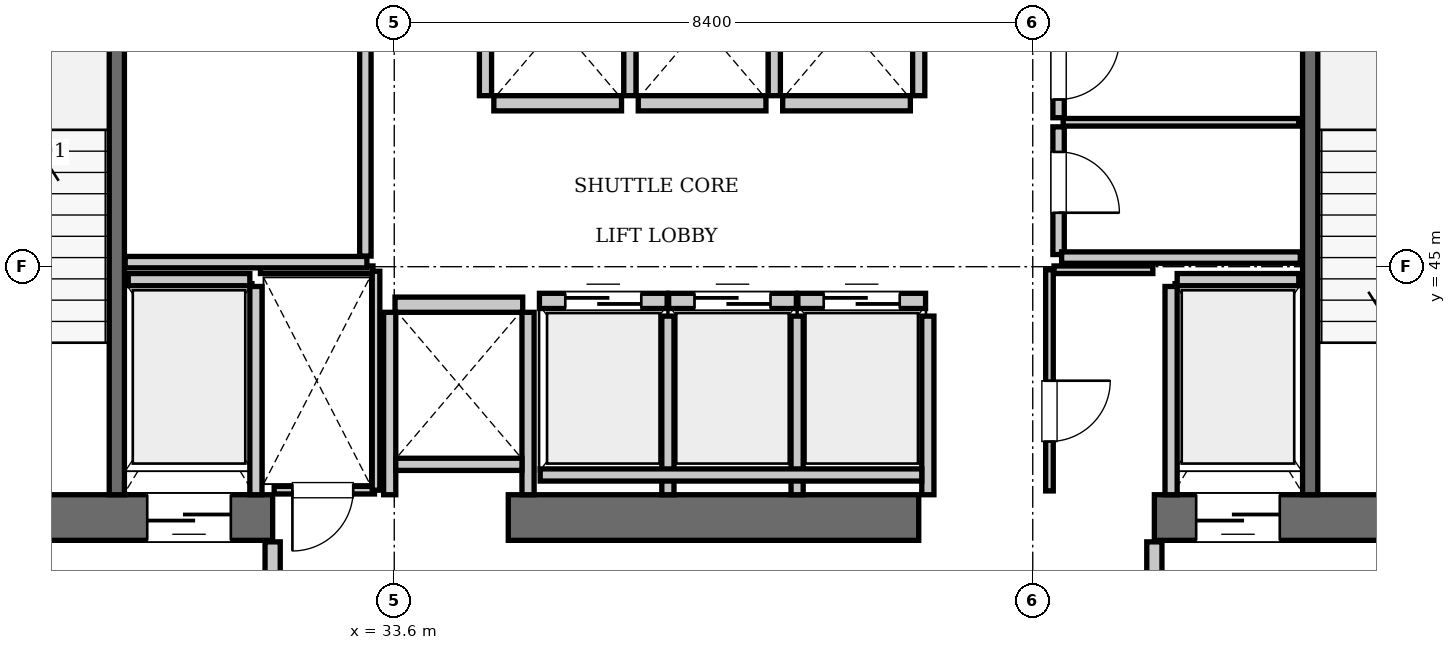
"""IFC4 building model, lengths in metres.
Left out: names, types, materials, properties, quantities, classifications, styles, units other than length and angle.
Written with IfcOpenShell. Run it as: python <this file> out.ifc"""

import sys

from ifc_helpers import new_model, si_unit, direction, frame, frame_2d, origin, place, context, subcontext, project, spatial, rectangle, extrude, element, fill, save


model = new_model("IFC4")
c1 = context("Model", 3, precision=1e-05, world=origin(), true_north=direction((0.0, 1.0)))
c2 = subcontext(c1, "Body", "Model", "MODEL_VIEW")
j1 = project(units=[si_unit("LENGTHUNIT", "METRE"), si_unit("PLANEANGLEUNIT", "RADIAN")], contexts=[c1])
p1 = place(None, origin())
s1 = spatial("IfcSite", under=j1, at=p1, CompositionType="ELEMENT")
p2 = place(p1, origin())
s2 = spatial("IfcBuilding", under=s1, at=p2, CompositionType="ELEMENT")
p3 = place(p2, frame((0.0, 0.0, 322.0)))
s3 = spatial("IfcBuildingStorey", under=s2, at=p3, CompositionType="ELEMENT", Elevation=322.0)
p4 = place(p3, frame((25.2, 41.7, 0.0), z_axis=(0.0, 0.0, 1.0), x_axis=(1.0, 0.0, 0.0)))
e1 = element("IfcWall", 1, at=p4, inside=s3, PredefinedType="SHEAR", context=c2, shape_type="SweptSolid", body=[
    extrude(rectangle(XDim=6.8, YDim=0.6, at=frame_2d((3.4, 0.0))), origin(), (0.0, 0.0, 1.0), 3.85),
])
p5 = place(p4, frame((1.65, 0.0, 0.0)))
e2 = element("IfcOpeningElement", 2, at=p5, cuts=e1, PredefinedType="OPENING", context=c2, shape_type="SweptSolid", body=[
    extrude(rectangle(XDim=1.15, YDim=2.15, at=frame_2d((0.575, 1.075))), frame((0.0, 0.31, 0.0), z_axis=(0.0, -1.0, 0.0), x_axis=(1.0, 0.0, 0.0)), (0.0, 0.0, 1.0), 0.62),
])
p6 = place(p4, frame((5.15, 0.0, 0.0)))
e3 = element("IfcOpeningElement", 3, at=p6, cuts=e1, PredefinedType="OPENING", context=c2, shape_type="SweptSolid", body=[
    extrude(rectangle(XDim=1.1, YDim=2.2, at=frame_2d((0.55, 1.1))), frame((0.0, 0.31, 0.0), z_axis=(0.0, -1.0, 0.0), x_axis=(1.0, 0.0, 0.0)), (0.0, 0.0, 1.0), 0.62),
])
p7 = place(p3, frame((35.1, 41.7, 0.0), z_axis=(0.0, 0.0, 1.0), x_axis=(1.0, 0.0, 0.0)))
e4 = element("IfcWall", 4, at=p7, inside=s3, PredefinedType="SHEAR", context=c2, shape_type="SweptSolid", body=[
    extrude(rectangle(XDim=5.4, YDim=0.6, at=frame_2d((2.7, 0.0))), origin(), (0.0, 0.0, 1.0), 3.85),
])
p8 = place(p3, frame((43.6, 41.7, 0.0), z_axis=(0.0, 0.0, 1.0), x_axis=(1.0, 0.0, 0.0)))
e5 = element("IfcWall", 5, at=p8, inside=s3, PredefinedType="SHEAR", context=c2, shape_type="SweptSolid", body=[
    extrude(rectangle(XDim=6.8, YDim=0.6, at=frame_2d((3.4, 0.0))), origin(), (0.0, 0.0, 1.0), 3.85),
])
p9 = place(p8, frame((3.9, 0.0, 0.0)))
e6 = element("IfcOpeningElement", 6, at=p9, cuts=e5, PredefinedType="OPENING", context=c2, shape_type="SweptSolid", body=[
    extrude(rectangle(XDim=1.15, YDim=2.15, at=frame_2d((0.575, 1.075))), frame((0.0, 0.31, 0.0), z_axis=(0.0, -1.0, 0.0), x_axis=(1.0, 0.0, 0.0)), (0.0, 0.0, 1.0), 0.62),
])
p10 = place(p8, frame((0.55, 0.0, 0.0)))
e7 = element("IfcOpeningElement", 7, at=p10, cuts=e5, PredefinedType="OPENING", context=c2, shape_type="SweptSolid", body=[
    extrude(rectangle(XDim=1.1, YDim=2.2, at=frame_2d((0.55, 1.1))), frame((0.0, 0.31, 0.0), z_axis=(0.0, -1.0, 0.0), x_axis=(1.0, 0.0, 0.0)), (0.0, 0.0, 1.0), 0.62),
])
for number, where, z_axis, x_axis in (
    (8, (29.95, 42.0, 0.0), (0.0, 0.0, 1.0), (0.0, 1.0, 0.0)),
    (9, (45.65, 42.0, 0.0), (0.0, 0.0, 1.0), (0.0, 1.0, 0.0)),
):
    element("IfcWall", number, at=place(p3, frame(where, z_axis=z_axis, x_axis=x_axis)), inside=s3, PredefinedType="SOLIDWALL", context=c2, shape_type="SweptSolid", body=[
        extrude(rectangle(XDim=9.15, YDim=0.2, at=frame_2d((4.575, 0.0))), origin(), (0.0, 0.0, 1.0), 3.61),
    ])
p11 = place(p3, frame((35.51, 44.55, 0.0), z_axis=(0.0, 0.0, 1.0), x_axis=(1.0, 0.0, 0.0)))
e10 = element("IfcWall", 10, at=p11, inside=s3, PredefinedType="SOLIDWALL", context=c2, shape_type="SweptSolid", body=[
    extrude(rectangle(XDim=1.68, YDim=0.2, at=frame_2d((0.84, 0.0))), origin(), (0.0, 0.0, 1.0), 3.61),
])
p12 = place(p11, frame((0.34, 0.0, 0.0)))
e11 = element("IfcOpeningElement", 11, at=p12, cuts=e10, PredefinedType="OPENING", context=c2, shape_type="SweptSolid", body=[
    extrude(rectangle(XDim=1.0, YDim=2.15, at=frame_2d((0.5, 1.075))), frame((0.0, 0.11, 0.0), z_axis=(0.0, -1.0, 0.0), x_axis=(1.0, 0.0, 0.0)), (0.0, 0.0, 1.0), 0.22),
])
p13 = place(p3, frame((37.21, 44.55, 0.0), z_axis=(0.0, 0.0, 1.0), x_axis=(1.0, 0.0, 0.0)))
e12 = element("IfcWall", 12, at=p13, inside=s3, PredefinedType="SOLIDWALL", context=c2, shape_type="SweptSolid", body=[
    extrude(rectangle(XDim=1.68, YDim=0.2, at=frame_2d((0.84, 0.0))), origin(), (0.0, 0.0, 1.0), 3.61),
])
p14 = place(p13, frame((0.34, 0.0, 0.0)))
e13 = element("IfcOpeningElement", 13, at=p14, cuts=e12, PredefinedType="OPENING", context=c2, shape_type="SweptSolid", body=[
    extrude(rectangle(XDim=1.0, YDim=2.15, at=frame_2d((0.5, 1.075))), frame((0.0, 0.11, 0.0), z_axis=(0.0, -1.0, 0.0), x_axis=(1.0, 0.0, 0.0)), (0.0, 0.0, 1.0), 0.22),
])
p15 = place(p3, frame((38.91, 44.55, 0.0), z_axis=(0.0, 0.0, 1.0), x_axis=(1.0, 0.0, 0.0)))
e14 = element("IfcWall", 14, at=p15, inside=s3, PredefinedType="SOLIDWALL", context=c2, shape_type="SweptSolid", body=[
    extrude(rectangle(XDim=1.68, YDim=0.2, at=frame_2d((0.84, 0.0))), origin(), (0.0, 0.0, 1.0), 3.61),
])
p16 = place(p15, frame((0.34, 0.0, 0.0)))
e15 = element("IfcOpeningElement", 15, at=p16, cuts=e14, PredefinedType="OPENING", context=c2, shape_type="SweptSolid", body=[
    extrude(rectangle(XDim=1.0, YDim=2.15, at=frame_2d((0.5, 1.075))), frame((0.0, 0.11, 0.0), z_axis=(0.0, -1.0, 0.0), x_axis=(1.0, 0.0, 0.0)), (0.0, 0.0, 1.0), 0.22),
])
p17 = place(p3, frame((34.91, 47.15, 0.0), z_axis=(0.0, 0.0, 1.0), x_axis=(1.0, 0.0, 0.0)))
e16 = element("IfcWall", 16, at=p17, inside=s3, PredefinedType="SOLIDWALL", context=c2, shape_type="SweptSolid", body=[
    extrude(rectangle(XDim=1.68, YDim=0.2, at=frame_2d((0.84, 0.0))), origin(), (0.0, 0.0, 1.0), 3.61),
])
for number, where, z_axis, x_axis in (
    (17, (36.81, 47.15, 0.0), (0.0, 0.0, 1.0), (1.0, 0.0, 0.0)),
    (18, (38.71, 47.15, 0.0), (0.0, 0.0, 1.0), (1.0, 0.0, 0.0)),
    (19, (33.61, 44.5, 0.0), (0.0, 0.0, 1.0), (1.0, 0.0, 0.0)),
):
    element("IfcWall", number, at=place(p3, frame(where, z_axis=z_axis, x_axis=x_axis)), inside=s3, PredefinedType="SOLIDWALL", context=c2, shape_type="SweptSolid", body=[
        extrude(rectangle(XDim=1.68, YDim=0.2, at=frame_2d((0.84, 0.0))), origin(), (0.0, 0.0, 1.0), 3.61),
    ])
p18 = place(p3, frame((30.1, 44.83, 0.0), z_axis=(0.0, 0.0, 1.0), x_axis=(1.0, 0.0, 0.0)))
e20 = element("IfcWall", 20, at=p18, inside=s3, PredefinedType="SOLIDWALL", context=c2, shape_type="SweptSolid", body=[
    extrude(rectangle(XDim=1.6, YDim=0.16, at=frame_2d((0.8, 0.0))), origin(), (0.0, 0.0, 1.0), 3.61),
])
p19 = place(p3, frame((31.78, 42.0, 0.0), z_axis=(0.0, 0.0, 1.0), x_axis=(0.0, 1.0, 0.0)))
e21 = element("IfcWall", 21, at=p19, inside=s3, PredefinedType="SOLIDWALL", context=c2, shape_type="SweptSolid", body=[
    extrude(rectangle(XDim=2.74, YDim=0.16, at=frame_2d((1.37, 0.0))), origin(), (0.0, 0.0, 1.0), 3.61),
])
p20 = place(p3, frame((43.9, 44.83, 0.0), z_axis=(0.0, 0.0, 1.0), x_axis=(1.0, 0.0, 0.0)))
e22 = element("IfcWall", 22, at=p20, inside=s3, PredefinedType="SOLIDWALL", context=c2, shape_type="SweptSolid", body=[
    extrude(rectangle(XDim=1.6, YDim=0.16, at=frame_2d((0.8, 0.0))), origin(), (0.0, 0.0, 1.0), 3.61),
])
p21 = place(p3, frame((43.82, 42.0, 0.0), z_axis=(0.0, 0.0, 1.0), x_axis=(0.0, 1.0, 0.0)))
e23 = element("IfcWall", 23, at=p21, inside=s3, PredefinedType="SOLIDWALL", context=c2, shape_type="SweptSolid", body=[
    extrude(rectangle(XDim=2.74, YDim=0.16, at=frame_2d((1.37, 0.0))), origin(), (0.0, 0.0, 1.0), 3.61),
])
for number, where, z_axis, x_axis in (
    (24, (37.2, 42.0, 0.0), (0.0, 0.0, 1.0), (0.0, 1.0, 0.0)),
    (25, (38.9, 42.0, 0.0), (0.0, 0.0, 1.0), (0.0, 1.0, 0.0)),
    (26, (40.62, 42.0, 0.0), (0.0, 0.0, 1.0), (0.0, 1.0, 0.0)),
):
    element("IfcWall", number, at=place(p3, frame(where, z_axis=z_axis, x_axis=x_axis)), inside=s3, PredefinedType="SOLIDWALL", context=c2, shape_type="SweptSolid", body=[
        extrude(rectangle(XDim=2.35, YDim=0.16, at=frame_2d((1.175, 0.0))), origin(), (0.0, 0.0, 1.0), 3.61),
    ])
p22 = place(p3, frame((35.52, 42.26, 0.0), z_axis=(0.0, 0.0, 1.0), x_axis=(1.0, 0.0, 0.0)))
e27 = element("IfcWall", 27, at=p22, inside=s3, PredefinedType="SOLIDWALL", context=c2, shape_type="SweptSolid", body=[
    extrude(rectangle(XDim=5.02, YDim=0.16, at=frame_2d((2.51, 0.0))), origin(), (0.0, 0.0, 1.0), 3.61),
])
for number, where, z_axis, x_axis in (
    (28, (34.8, 47.25, 0.0), (0.0, 0.0, 1.0), (0.0, 1.0, 0.0)),
    (29, (36.7, 47.25, 0.0), (0.0, 0.0, 1.0), (0.0, 1.0, 0.0)),
    (30, (38.6, 47.25, 0.0), (0.0, 0.0, 1.0), (0.0, 1.0, 0.0)),
    (31, (40.5, 47.25, 0.0), (0.0, 0.0, 1.0), (0.0, 1.0, 0.0)),
):
    element("IfcWall", number, at=place(p3, frame(where, z_axis=z_axis, x_axis=x_axis)), inside=s3, PredefinedType="SOLIDWALL", context=c2, shape_type="SweptSolid", body=[
        extrude(rectangle(XDim=2.19, YDim=0.16, at=frame_2d((1.095, 0.0))), origin(), (0.0, 0.0, 1.0), 3.61),
    ])
for number, where, z_axis, x_axis in (
    (32, (33.54, 42.0, 0.0), (0.0, 0.0, 1.0), (0.0, 1.0, 0.0)),
    (33, (35.36, 42.0, 0.0), (0.0, 0.0, 1.0), (0.0, 1.0, 0.0)),
):
    element("IfcWall", number, at=place(p3, frame(where, z_axis=z_axis, x_axis=x_axis)), inside=s3, PredefinedType="SOLIDWALL", context=c2, shape_type="SweptSolid", body=[
        extrude(rectangle(XDim=2.4, YDim=0.16, at=frame_2d((1.2, 0.0))), origin(), (0.0, 0.0, 1.0), 3.61),
    ])
p23 = place(p3, frame((33.62, 42.4, 0.0), z_axis=(0.0, 0.0, 1.0), x_axis=(1.0, 0.0, 0.0)))
e34 = element("IfcWall", 34, at=p23, inside=s3, PredefinedType="SOLIDWALL", context=c2, shape_type="SweptSolid", body=[
    extrude(rectangle(XDim=1.66, YDim=0.16, at=frame_2d((0.83, 0.0))), origin(), (0.0, 0.0, 1.0), 3.61),
])
for number, where, z_axis, x_axis in (
    (35, (32.0, 38.31, 0.0), (0.0, 0.0, 1.0), (0.0, 1.0, 0.0)),
    (36, (43.6, 38.31, 0.0), (0.0, 0.0, 1.0), (0.0, 1.0, 0.0)),
):
    element("IfcWall", number, at=place(p3, frame(where, z_axis=z_axis, x_axis=x_axis)), inside=s3, PredefinedType="PARTITIONING", context=c2, shape_type="SweptSolid", body=[
        extrude(rectangle(XDim=3.07, YDim=0.2, at=frame_2d((1.535, 0.0))), origin(), (0.0, 0.0, 1.0), 3.61),
    ])
p24 = place(p3, frame((32.02, 42.06, 0.0), z_axis=(0.0, 0.0, 1.0), x_axis=(1.0, 0.0, 0.0)))
e37 = element("IfcWall", 37, at=p24, inside=s3, PredefinedType="PARTITIONING", context=c2, shape_type="SweptSolid", body=[
    extrude(rectangle(XDim=1.32, YDim=0.1, at=frame_2d((0.66, 0.0))), origin(), (0.0, 0.0, 1.0), 3.61),
])
p25 = place(p24, frame((0.24, 0.0, 0.0)))
e38 = element("IfcOpeningElement", 38, at=p25, cuts=e37, PredefinedType="OPENING", context=c2, shape_type="SweptSolid", body=[
    extrude(rectangle(XDim=0.8, YDim=2.05, at=frame_2d((0.4, 1.025))), frame((0.0, 0.06, 0.0), z_axis=(0.0, -1.0, 0.0), x_axis=(1.0, 0.0, 0.0)), (0.0, 0.0, 1.0), 0.12),
])
p26 = place(p3, frame((31.84, 44.96, 0.0), z_axis=(0.0, 0.0, 1.0), x_axis=(1.0, 0.0, 0.0)))
e39 = element("IfcWall", 39, at=p26, inside=s3, PredefinedType="PARTITIONING", context=c2, shape_type="SweptSolid", body=[
    extrude(rectangle(XDim=1.48, YDim=0.1, at=frame_2d((0.74, 0.0))), origin(), (0.0, 0.0, 1.0), 3.61),
])
p27 = place(p3, frame((33.36, 42.06, 0.0), z_axis=(0.0, 0.0, 1.0), x_axis=(0.0, 1.0, 0.0)))
e40 = element("IfcWall", 40, at=p27, inside=s3, PredefinedType="PARTITIONING", context=c2, shape_type="SweptSolid", body=[
    extrude(rectangle(XDim=2.88, YDim=0.1, at=frame_2d((1.44, 0.0))), origin(), (0.0, 0.0, 1.0), 3.61),
])
p28 = place(p3, frame((42.22, 42.05, 0.0), z_axis=(0.0, 0.0, 1.0), x_axis=(0.0, 1.0, 0.0)))
e41 = element("IfcWall", 41, at=p28, inside=s3, PredefinedType="PARTITIONING", context=c2, shape_type="SweptSolid", body=[
    extrude(rectangle(XDim=2.91, YDim=0.1, at=frame_2d((1.455, 0.0))), origin(), (0.0, 0.0, 1.0), 3.61),
])
p29 = place(p28, frame((0.65, 0.0, 0.0)))
e42 = element("IfcOpeningElement", 42, at=p29, cuts=e41, PredefinedType="OPENING", context=c2, shape_type="SweptSolid", body=[
    extrude(rectangle(XDim=0.8, YDim=2.05, at=frame_2d((0.4, 1.025))), frame((0.0, 0.06, 0.0), z_axis=(0.0, -1.0, 0.0), x_axis=(1.0, 0.0, 0.0)), (0.0, 0.0, 1.0), 0.12),
])
p30 = place(p3, frame((42.28, 44.96, 0.0), z_axis=(0.0, 0.0, 1.0), x_axis=(1.0, 0.0, 0.0)))
e43 = element("IfcWall", 43, at=p30, inside=s3, PredefinedType="PARTITIONING", context=c2, shape_type="SweptSolid", body=[
    extrude(rectangle(XDim=1.3, YDim=0.1, at=frame_2d((0.65, 0.0))), origin(), (0.0, 0.0, 1.0), 3.61),
])
p31 = place(p3, frame((30.06, 45.06, 0.0), z_axis=(0.0, 0.0, 1.0), x_axis=(1.0, 0.0, 0.0)))
e44 = element("IfcWall", 44, at=p31, inside=s3, PredefinedType="PARTITIONING", context=c2, shape_type="SweptSolid", body=[
    extrude(rectangle(XDim=3.18, YDim=0.15, at=frame_2d((1.59, 0.0))), origin(), (0.0, 0.0, 1.0), 3.61),
])
p32 = place(p3, frame((33.22, 45.14, 0.0), z_axis=(0.0, 0.0, 1.0), x_axis=(0.0, 1.0, 0.0)))
e45 = element("IfcWall", 45, at=p32, inside=s3, PredefinedType="PARTITIONING", context=c2, shape_type="SweptSolid", body=[
    extrude(rectangle(XDim=4.16, YDim=0.15, at=frame_2d((2.08, 0.0))), origin(), (0.0, 0.0, 1.0), 3.61),
])
p33 = place(p3, frame((42.34, 45.16, 0.0), z_axis=(0.0, 0.0, 1.0), x_axis=(0.0, 1.0, 0.0)))
e46 = element("IfcWall", 46, at=p33, inside=s3, PredefinedType="PARTITIONING", context=c2, shape_type="SweptSolid", body=[
    extrude(rectangle(XDim=1.68, YDim=0.15, at=frame_2d((0.84, 0.0))), origin(), (0.0, 0.0, 1.0), 3.61),
])
p34 = place(p33, frame((0.55, 0.0, 0.0)))
e47 = element("IfcOpeningElement", 47, at=p34, cuts=e46, PredefinedType="OPENING", context=c2, shape_type="SweptSolid", body=[
    extrude(rectangle(XDim=0.8, YDim=2.05, at=frame_2d((0.4, 1.025))), frame((0.0, 0.085, 0.0), z_axis=(0.0, -1.0, 0.0), x_axis=(1.0, 0.0, 0.0)), (0.0, 0.0, 1.0), 0.17),
])
p35 = place(p3, frame((42.34, 46.96, 0.0), z_axis=(0.0, 0.0, 1.0), x_axis=(0.0, 1.0, 0.0)))
e48 = element("IfcWall", 48, at=p35, inside=s3, PredefinedType="PARTITIONING", context=c2, shape_type="SweptSolid", body=[
    extrude(rectangle(XDim=2.46, YDim=0.15, at=frame_2d((1.23, 0.0))), origin(), (0.0, 0.0, 1.0), 3.61),
])
p36 = place(p35, frame((0.24, 0.0, 0.0)))
e49 = element("IfcOpeningElement", 49, at=p36, cuts=e48, PredefinedType="OPENING", context=c2, shape_type="SweptSolid", body=[
    extrude(rectangle(XDim=0.8, YDim=2.05, at=frame_2d((0.4, 1.025))), frame((0.0, 0.085, 0.0), z_axis=(0.0, -1.0, 0.0), x_axis=(1.0, 0.0, 0.0)), (0.0, 0.0, 1.0), 0.17),
])
p37 = place(p3, frame((42.4, 46.9, 0.0), z_axis=(0.0, 0.0, 1.0), x_axis=(1.0, 0.0, 0.0)))
e50 = element("IfcWall", 50, at=p37, inside=s3, PredefinedType="PARTITIONING", context=c2, shape_type="SweptSolid", body=[
    extrude(rectangle(XDim=3.1, YDim=0.1, at=frame_2d((1.55, 0.0))), origin(), (0.0, 0.0, 1.0), 3.61),
])
p38 = place(p3, frame((42.38, 45.12, 0.0), z_axis=(0.0, 0.0, 1.0), x_axis=(1.0, 0.0, 0.0)))
e51 = element("IfcWall", 51, at=p38, inside=s3, PredefinedType="PARTITIONING", context=c2, shape_type="SweptSolid", body=[
    extrude(rectangle(XDim=3.14, YDim=0.15, at=frame_2d((1.57, 0.0))), origin(), (0.0, 0.0, 1.0), 3.61),
])
p39 = place(p12, origin())
e52 = element("IfcDoor", 52, at=p39, inside=s3, OperationType="SLIDING_TO_LEFT", PredefinedType="DOOR", context=c2, shape_type="SweptSolid", body=[
    extrude(rectangle(XDim=1.0, YDim=2.15, at=frame_2d((0.5, 1.075))), frame((0.0, 0.025, 0.0), z_axis=(0.0, -1.0, 0.0), x_axis=(1.0, 0.0, 0.0)), (0.0, 0.0, 1.0), 0.05),
])
fill(e11, e52)
p40 = place(p14, origin())
e53 = element("IfcDoor", 53, at=p40, inside=s3, OperationType="SLIDING_TO_LEFT", PredefinedType="DOOR", context=c2, shape_type="SweptSolid", body=[
    extrude(rectangle(XDim=1.0, YDim=2.15, at=frame_2d((0.5, 1.075))), frame((0.0, 0.025, 0.0), z_axis=(0.0, -1.0, 0.0), x_axis=(1.0, 0.0, 0.0)), (0.0, 0.0, 1.0), 0.05),
])
fill(e13, e53)
p41 = place(p16, origin())
e54 = element("IfcDoor", 54, at=p41, inside=s3, OperationType="SLIDING_TO_LEFT", PredefinedType="DOOR", context=c2, shape_type="SweptSolid", body=[
    extrude(rectangle(XDim=1.0, YDim=2.15, at=frame_2d((0.5, 1.075))), frame((0.0, 0.025, 0.0), z_axis=(0.0, -1.0, 0.0), x_axis=(1.0, 0.0, 0.0)), (0.0, 0.0, 1.0), 0.05),
])
fill(e15, e54)
p42 = place(p6, frame((1.1, 0.0, 0.0), z_axis=(0.0, 0.0, 1.0), x_axis=(-1.0, 0.0, 0.0)))
e55 = element("IfcDoor", 55, at=p42, inside=s3, OperationType="SLIDING_TO_LEFT", PredefinedType="DOOR", context=c2, shape_type="SweptSolid", body=[
    extrude(rectangle(XDim=1.1, YDim=2.2, at=frame_2d((0.55, 1.1))), frame((0.0, 0.025, 0.0), z_axis=(0.0, -1.0, 0.0), x_axis=(1.0, 0.0, 0.0)), (0.0, 0.0, 1.0), 0.05),
])
fill(e3, e55)
p43 = place(p10, frame((1.1, 0.0, 0.0), z_axis=(0.0, 0.0, 1.0), x_axis=(-1.0, 0.0, 0.0)))
e56 = element("IfcDoor", 56, at=p43, inside=s3, OperationType="SLIDING_TO_LEFT", PredefinedType="DOOR", context=c2, shape_type="SweptSolid", body=[
    extrude(rectangle(XDim=1.1, YDim=2.2, at=frame_2d((0.55, 1.1))), frame((0.0, 0.025, 0.0), z_axis=(0.0, -1.0, 0.0), x_axis=(1.0, 0.0, 0.0)), (0.0, 0.0, 1.0), 0.05),
])
fill(e7, e56)
p44 = place(p25, frame((0.8, 0.0, 0.0), z_axis=(0.0, 0.0, 1.0), x_axis=(-1.0, 0.0, 0.0)))
e57 = element("IfcDoor", 57, at=p44, inside=s3, OperationType="SINGLE_SWING_RIGHT", PredefinedType="DOOR", context=c2, shape_type="SweptSolid", body=[
    extrude(rectangle(XDim=0.8, YDim=2.05, at=frame_2d((0.4, 1.025))), frame((0.0, 0.025, 0.0), z_axis=(0.0, -1.0, 0.0), x_axis=(1.0, 0.0, 0.0)), (0.0, 0.0, 1.0), 0.05),
])
fill(e38, e57)
p45 = place(p29, frame((0.8, 0.0, 0.0), z_axis=(0.0, 0.0, 1.0), x_axis=(-1.0, 0.0, 0.0)))
e58 = element("IfcDoor", 58, at=p45, inside=s3, OperationType="SINGLE_SWING_LEFT", PredefinedType="DOOR", context=c2, shape_type="SweptSolid", body=[
    extrude(rectangle(XDim=0.8, YDim=2.05, at=frame_2d((0.4, 1.025))), frame((0.0, 0.025, 0.0), z_axis=(0.0, -1.0, 0.0), x_axis=(1.0, 0.0, 0.0)), (0.0, 0.0, 1.0), 0.05),
])
fill(e42, e58)
p46 = place(p34, frame((0.8, 0.0, 0.0), z_axis=(0.0, 0.0, 1.0), x_axis=(-1.0, 0.0, 0.0)))
e59 = element("IfcDoor", 59, at=p46, inside=s3, OperationType="SINGLE_SWING_RIGHT", PredefinedType="DOOR", context=c2, shape_type="SweptSolid", body=[
    extrude(rectangle(XDim=0.8, YDim=2.05, at=frame_2d((0.4, 1.025))), frame((0.0, 0.025, 0.0), z_axis=(0.0, -1.0, 0.0), x_axis=(1.0, 0.0, 0.0)), (0.0, 0.0, 1.0), 0.05),
])
fill(e47, e59)
p47 = place(p36, frame((0.8, 0.0, 0.0), z_axis=(0.0, 0.0, 1.0), x_axis=(-1.0, 0.0, 0.0)))
e60 = element("IfcDoor", 60, at=p47, inside=s3, OperationType="SINGLE_SWING_LEFT", PredefinedType="DOOR", context=c2, shape_type="SweptSolid", body=[
    extrude(rectangle(XDim=0.8, YDim=2.05, at=frame_2d((0.4, 1.025))), frame((0.0, 0.025, 0.0), z_axis=(0.0, -1.0, 0.0), x_axis=(1.0, 0.0, 0.0)), (0.0, 0.0, 1.0), 0.05),
])
fill(e49, e60)
save(model, sys.argv[1])
